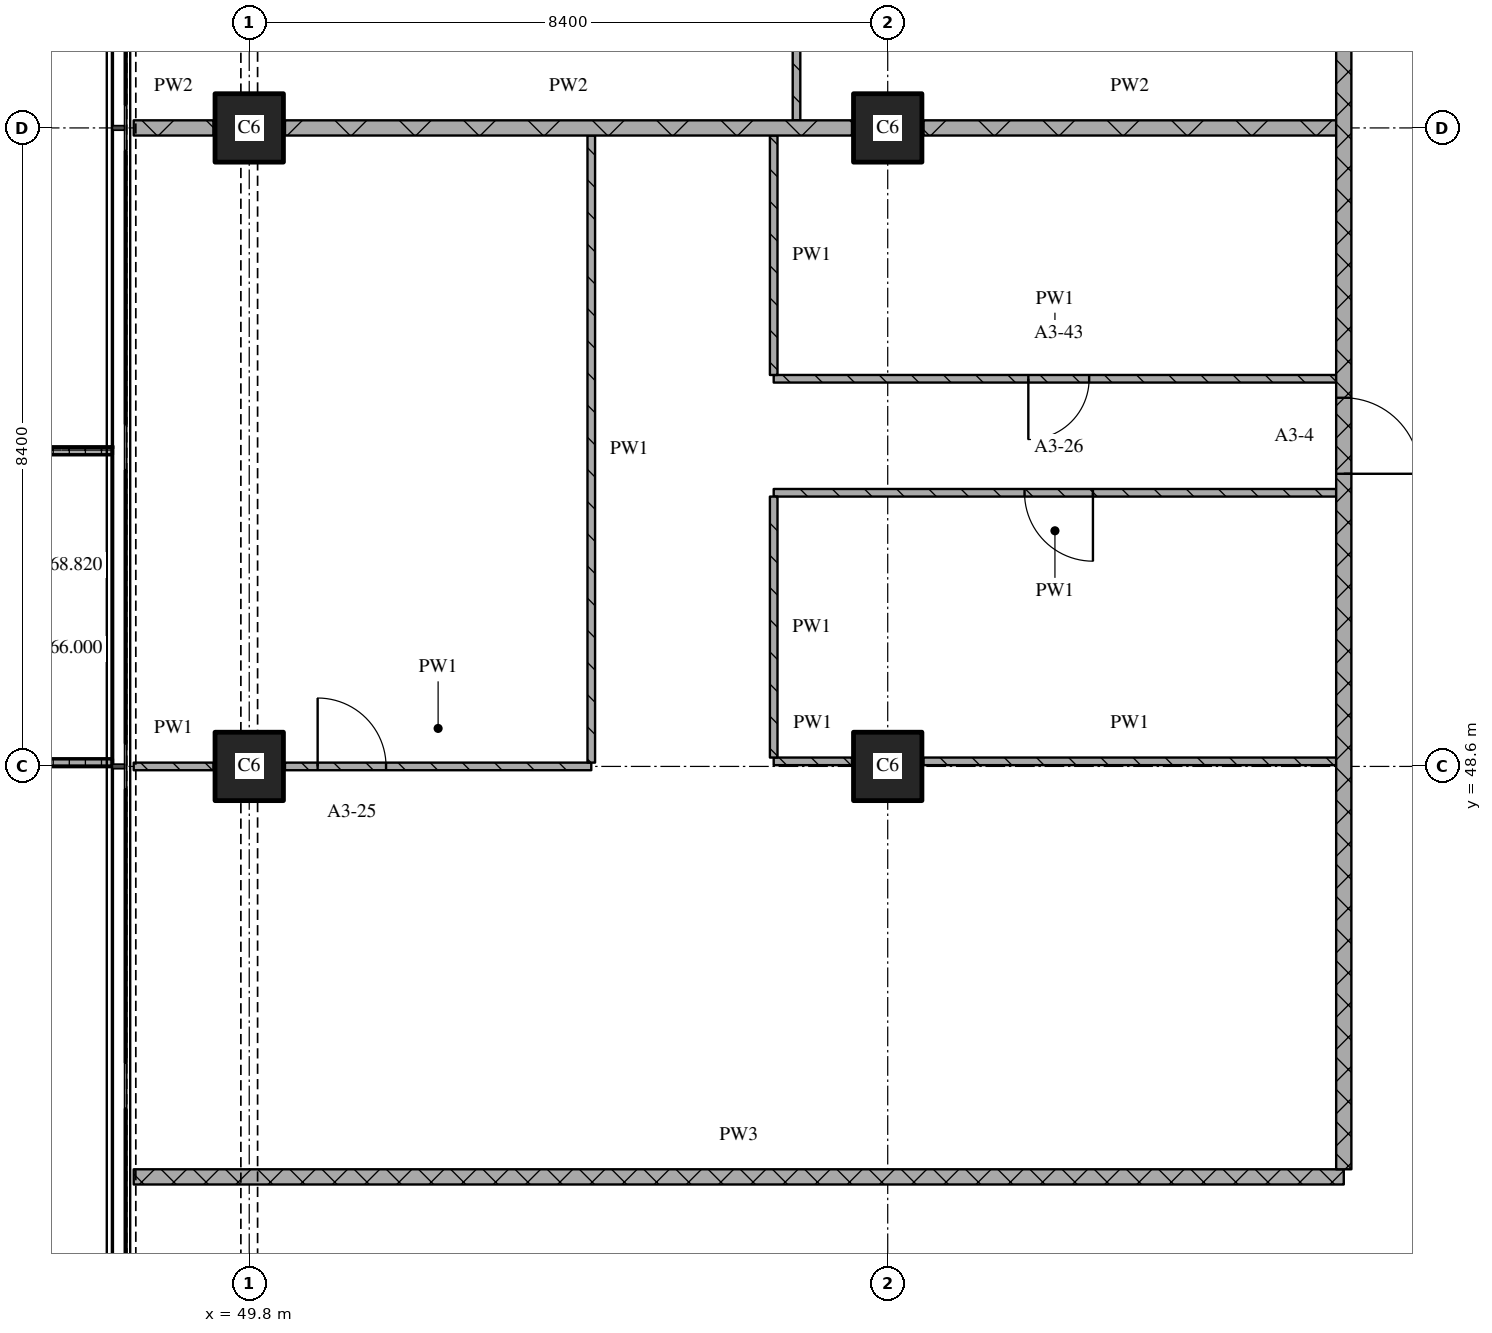
"""IFC4 building model, lengths in metres.
Left out: names, types, materials, properties, quantities, classifications, styles, units other than length and angle.
Written with IfcOpenShell. Run it as: python <this file> out.ifc"""

import sys

from ifc_helpers import new_model, si_unit, direction, frame, frame_2d, origin, origin_2d, place, context, subcontext, project, spatial, polyline, rectangle, outline, extrude, element, fill, save


model = new_model("IFC4")
c1 = context("Model", 3, precision=1e-05, world=origin(), true_north=direction((0.0, 1.0)))
c2 = subcontext(c1, "Body", "Model", "MODEL_VIEW")
j1 = project(units=[si_unit("LENGTHUNIT", "METRE"), si_unit("PLANEANGLEUNIT", "RADIAN")], contexts=[c1])
p1 = place(None, origin())
s1 = spatial("IfcSite", under=j1, at=p1, CompositionType="ELEMENT")
p2 = place(p1, origin())
s2 = spatial("IfcBuilding", under=s1, at=p2, CompositionType="ELEMENT")
p3 = place(p2, frame((0.0, 0.0, 66.0)))
s3 = spatial("IfcBuildingStorey", under=s2, at=p3, CompositionType="ELEMENT", Elevation=66.0)
for number, where, z_axis, x_axis in (
    (1, (49.8, 48.6, 0.0), (0.0, 0.0, 1.0), (1.0, 0.0, 0.0)),
    (2, (49.8, 57.0, 0.0), (0.0, 0.0, 1.0), (1.0, 0.0, 0.0)),
    (3, (58.2, 48.6, 0.0), (0.0, 0.0, 1.0), (1.0, 0.0, 0.0)),
    (4, (58.2, 57.0, 0.0), (0.0, 0.0, 1.0), (1.0, 0.0, 0.0)),
):
    element("IfcColumn", number, at=place(p3, frame(where, z_axis=z_axis, x_axis=x_axis)), inside=s3, PredefinedType="COLUMN", context=c2, shape_type="SweptSolid", body=[
        extrude(rectangle(XDim=0.9, YDim=0.9, at=origin_2d()), origin(), (0.0, 0.0, 1.0), 3.6),
    ])
p4 = place(p3, origin())
e5 = element("IfcWall", 5, at=p4, inside=s3, PredefinedType="SOLIDWALL", context=c2, shape_type="SweptSolid", body=[
    extrude(outline(polyline([(48.0, 52.8), (48.0, 52.7), (46.367, 52.7), (46.367, 48.7), (48.0, 48.7), (48.0, 48.6), (46.267, 48.6), (46.267, 52.8), (48.0, 52.8)])), origin(), (0.0, 0.0, 1.0), 1.0),
])
p5 = place(p3, frame((48.28, 43.2, 0.0), z_axis=(0.0, 0.0, 1.0), x_axis=(1.0, 0.0, 0.0)))
e6 = element("IfcWall", 6, at=p5, inside=s3, PredefinedType="PARTITIONING", context=c2, shape_type="SweptSolid", body=[
    extrude(rectangle(XDim=15.92, YDim=0.2, at=frame_2d((7.96, 0.0))), origin(), (0.0, 0.0, 1.0), 3.32),
])
p6 = place(p3, frame((48.28, 48.6, 0.0), z_axis=(0.0, 0.0, 1.0), x_axis=(1.0, 0.0, 0.0)))
e7 = element("IfcWall", 7, at=p6, inside=s3, PredefinedType="PARTITIONING", context=c2, shape_type="SweptSolid", body=[
    extrude(rectangle(XDim=1.05, YDim=0.1, at=frame_2d((0.525, 0.0))), origin(), (0.0, 0.0, 1.0), 3.32),
])
p7 = place(p3, frame((50.27, 48.6, 0.0), z_axis=(0.0, 0.0, 1.0), x_axis=(1.0, 0.0, 0.0)))
e8 = element("IfcWall", 8, at=p7, inside=s3, PredefinedType="PARTITIONING", context=c2, shape_type="SweptSolid", body=[
    extrude(rectangle(XDim=4.03, YDim=0.1, at=frame_2d((2.015, 0.0))), origin(), (0.0, 0.0, 1.0), 3.32),
])
p8 = place(p7, frame((0.43, 0.0, 0.0)))
e9 = element("IfcOpeningElement", 9, at=p8, cuts=e8, PredefinedType="OPENING", context=c2, shape_type="SweptSolid", body=[
    extrude(rectangle(XDim=0.9, YDim=2.1, at=frame_2d((0.45, 1.05))), frame((0.0, 0.06, 0.0), z_axis=(0.0, -1.0, 0.0), x_axis=(1.0, 0.0, 0.0)), (0.0, 0.0, 1.0), 0.12),
])
p9 = place(p3, frame((56.7, 48.667, 0.0), z_axis=(0.0, 0.0, 1.0), x_axis=(1.0, 0.0, 0.0)))
e10 = element("IfcWall", 10, at=p9, inside=s3, PredefinedType="PARTITIONING", context=c2, shape_type="SweptSolid", body=[
    extrude(rectangle(XDim=1.03, YDim=0.1, at=frame_2d((0.515, 0.0))), origin(), (0.0, 0.0, 1.0), 3.32),
])
p10 = place(p3, frame((58.67, 48.667, 0.0), z_axis=(0.0, 0.0, 1.0), x_axis=(1.0, 0.0, 0.0)))
e11 = element("IfcWall", 11, at=p10, inside=s3, PredefinedType="PARTITIONING", context=c2, shape_type="SweptSolid", body=[
    extrude(rectangle(XDim=5.43, YDim=0.1, at=frame_2d((2.715, 0.0))), origin(), (0.0, 0.0, 1.0), 3.32),
])
p11 = place(p3, frame((64.1, 52.2, 0.0), z_axis=(0.0, 0.0, 1.0), x_axis=(-1.0, 0.0, 0.0)))
e12 = element("IfcWall", 12, at=p11, inside=s3, PredefinedType="PARTITIONING", context=c2, shape_type="SweptSolid", body=[
    extrude(rectangle(XDim=7.4, YDim=0.1, at=frame_2d((3.7, 0.0))), origin(), (0.0, 0.0, 1.0), 3.32),
])
p12 = place(p11, frame((3.2, 0.0, 0.0)))
e13 = element("IfcOpeningElement", 13, at=p12, cuts=e12, PredefinedType="OPENING", context=c2, shape_type="SweptSolid", body=[
    extrude(rectangle(XDim=0.9, YDim=2.1, at=frame_2d((0.45, 1.05))), frame((0.0, 0.06, 0.0), z_axis=(0.0, -1.0, 0.0), x_axis=(1.0, 0.0, 0.0)), (0.0, 0.0, 1.0), 0.12),
])
p13 = place(p3, frame((56.7, 53.7, 0.0), z_axis=(0.0, 0.0, 1.0), x_axis=(1.0, 0.0, 0.0)))
e14 = element("IfcWall", 14, at=p13, inside=s3, PredefinedType="PARTITIONING", context=c2, shape_type="SweptSolid", body=[
    extrude(rectangle(XDim=7.4, YDim=0.1, at=frame_2d((3.7, 0.0))), origin(), (0.0, 0.0, 1.0), 3.32),
])
p14 = place(p13, frame((3.35, 0.0, 0.0)))
e15 = element("IfcOpeningElement", 15, at=p14, cuts=e14, PredefinedType="OPENING", context=c2, shape_type="SweptSolid", body=[
    extrude(rectangle(XDim=0.8, YDim=2.1, at=frame_2d((0.4, 1.05))), frame((0.0, 0.06, 0.0), z_axis=(0.0, -1.0, 0.0), x_axis=(1.0, 0.0, 0.0)), (0.0, 0.0, 1.0), 0.12),
])
p15 = place(p3, frame((48.28, 57.0, 0.0), z_axis=(0.0, 0.0, 1.0), x_axis=(1.0, 0.0, 0.0)))
e16 = element("IfcWall", 16, at=p15, inside=s3, PredefinedType="PARTITIONING", context=c2, shape_type="SweptSolid", body=[
    extrude(rectangle(XDim=1.05, YDim=0.2, at=frame_2d((0.525, 0.0))), origin(), (0.0, 0.0, 1.0), 3.32),
])
p16 = place(p3, frame((50.27, 57.0, 0.0), z_axis=(0.0, 0.0, 1.0), x_axis=(1.0, 0.0, 0.0)))
e17 = element("IfcWall", 17, at=p16, inside=s3, PredefinedType="PARTITIONING", context=c2, shape_type="SweptSolid", body=[
    extrude(rectangle(XDim=7.46, YDim=0.2, at=frame_2d((3.73, 0.0))), origin(), (0.0, 0.0, 1.0), 3.32),
])
p17 = place(p3, frame((58.67, 57.0, 0.0), z_axis=(0.0, 0.0, 1.0), x_axis=(1.0, 0.0, 0.0)))
e18 = element("IfcWall", 18, at=p17, inside=s3, PredefinedType="PARTITIONING", context=c2, shape_type="SweptSolid", body=[
    extrude(rectangle(XDim=5.43, YDim=0.2, at=frame_2d((2.715, 0.0))), origin(), (0.0, 0.0, 1.0), 3.32),
])
p18 = place(p3, frame((54.3, 56.9, 0.0), z_axis=(0.0, 0.0, 1.0), x_axis=(0.0, -1.0, 0.0)))
e19 = element("IfcWall", 19, at=p18, inside=s3, PredefinedType="PARTITIONING", context=c2, shape_type="SweptSolid", body=[
    extrude(rectangle(XDim=8.25, YDim=0.1, at=frame_2d((4.125, 0.0))), origin(), (0.0, 0.0, 1.0), 3.32),
])
p19 = place(p3, frame((56.7, 52.15, 0.0), z_axis=(0.0, 0.0, 1.0), x_axis=(0.0, -1.0, 0.0)))
e20 = element("IfcWall", 20, at=p19, inside=s3, PredefinedType="PARTITIONING", context=c2, shape_type="SweptSolid", body=[
    extrude(rectangle(XDim=3.433, YDim=0.1, at=frame_2d((1.717, 0.0))), origin(), (0.0, 0.0, 1.0), 3.32),
])
p20 = place(p3, frame((56.7, 56.9, 0.0), z_axis=(0.0, 0.0, 1.0), x_axis=(0.0, -1.0, 0.0)))
e21 = element("IfcWall", 21, at=p20, inside=s3, PredefinedType="PARTITIONING", context=c2, shape_type="SweptSolid", body=[
    extrude(rectangle(XDim=3.15, YDim=0.1, at=frame_2d((1.575, 0.0))), origin(), (0.0, 0.0, 1.0), 3.32),
])
p21 = place(p3, frame((57.0, 62.05, 0.0), z_axis=(0.0, 0.0, 1.0), x_axis=(0.0, -1.0, 0.0)))
e22 = element("IfcWall", 22, at=p21, inside=s3, PredefinedType="PARTITIONING", context=c2, shape_type="SweptSolid", body=[
    extrude(rectangle(XDim=4.95, YDim=0.1, at=frame_2d((2.475, 0.0))), origin(), (0.0, 0.0, 1.0), 3.32),
])
p22 = place(p21, frame((3.15, 0.0, 0.0)))
e23 = element("IfcOpeningElement", 23, at=p22, cuts=e22, PredefinedType="OPENING", context=c2, shape_type="SweptSolid", body=[
    extrude(rectangle(XDim=0.8, YDim=2.1, at=frame_2d((0.4, 1.05))), frame((0.0, 0.06, 0.0), z_axis=(0.0, -1.0, 0.0), x_axis=(1.0, 0.0, 0.0)), (0.0, 0.0, 1.0), 0.12),
])
p23 = place(p3, frame((64.2, 43.3, 0.0), z_axis=(0.0, 0.0, 1.0), x_axis=(0.0, 1.0, 0.0)))
e24 = element("IfcWall", 24, at=p23, inside=s3, PredefinedType="PARTITIONING", context=c2, shape_type="SweptSolid", body=[
    extrude(rectangle(XDim=32.02, YDim=0.2, at=frame_2d((16.01, 0.0))), origin(), (0.0, 0.0, 1.0), 3.32),
])
p24 = place(p23, frame((9.15, 0.0, 0.0)))
e25 = element("IfcOpeningElement", 25, at=p24, cuts=e24, PredefinedType="OPENING", context=c2, shape_type="SweptSolid", body=[
    extrude(rectangle(XDim=1.0, YDim=2.1, at=frame_2d((0.5, 1.05))), frame((0.0, 0.11, 0.0), z_axis=(0.0, -1.0, 0.0), x_axis=(1.0, 0.0, 0.0)), (0.0, 0.0, 1.0), 0.22),
])
p25 = place(p23, frame((19.05, 0.0, 0.0)))
e26 = element("IfcOpeningElement", 26, at=p25, cuts=e24, PredefinedType="OPENING", context=c2, shape_type="SweptSolid", body=[
    extrude(rectangle(XDim=1.0, YDim=2.1, at=frame_2d((0.5, 1.05))), frame((0.0, 0.11, 0.0), z_axis=(0.0, -1.0, 0.0), x_axis=(1.0, 0.0, 0.0)), (0.0, 0.0, 1.0), 0.22),
])
p26 = place(p8, origin())
e27 = element("IfcDoor", 27, at=p26, inside=s3, OperationType="SINGLE_SWING_LEFT", PredefinedType="DOOR", context=c2, shape_type="SweptSolid", body=[
    extrude(rectangle(XDim=0.9, YDim=2.1, at=frame_2d((0.45, 1.05))), frame((0.0, 0.025, 0.0), z_axis=(0.0, -1.0, 0.0), x_axis=(1.0, 0.0, 0.0)), (0.0, 0.0, 1.0), 0.05),
])
fill(e9, e27)
p27 = place(p12, origin())
e28 = element("IfcDoor", 28, at=p27, inside=s3, OperationType="SINGLE_SWING_LEFT", PredefinedType="DOOR", context=c2, shape_type="SweptSolid", body=[
    extrude(rectangle(XDim=0.9, YDim=2.1, at=frame_2d((0.45, 1.05))), frame((0.0, 0.025, 0.0), z_axis=(0.0, -1.0, 0.0), x_axis=(1.0, 0.0, 0.0)), (0.0, 0.0, 1.0), 0.05),
])
fill(e13, e28)
p28 = place(p14, origin())
e29 = element("IfcDoor", 29, at=p28, inside=s3, OperationType="SINGLE_SWING_RIGHT", PredefinedType="DOOR", context=c2, shape_type="SweptSolid", body=[
    extrude(rectangle(XDim=0.8, YDim=2.1, at=frame_2d((0.4, 1.05))), frame((0.0, 0.025, 0.0), z_axis=(0.0, -1.0, 0.0), x_axis=(1.0, 0.0, 0.0)), (0.0, 0.0, 1.0), 0.05),
])
fill(e15, e29)
p29 = place(p24, origin())
e30 = element("IfcDoor", 30, at=p29, inside=s3, OperationType="SINGLE_SWING_RIGHT", PredefinedType="DOOR", context=c2, shape_type="SweptSolid", body=[
    extrude(rectangle(XDim=1.0, YDim=2.1, at=frame_2d((0.5, 1.05))), frame((0.0, 0.025, 0.0), z_axis=(0.0, -1.0, 0.0), x_axis=(1.0, 0.0, 0.0)), (0.0, 0.0, 1.0), 0.05),
])
fill(e25, e30)
save(model, sys.argv[1])
